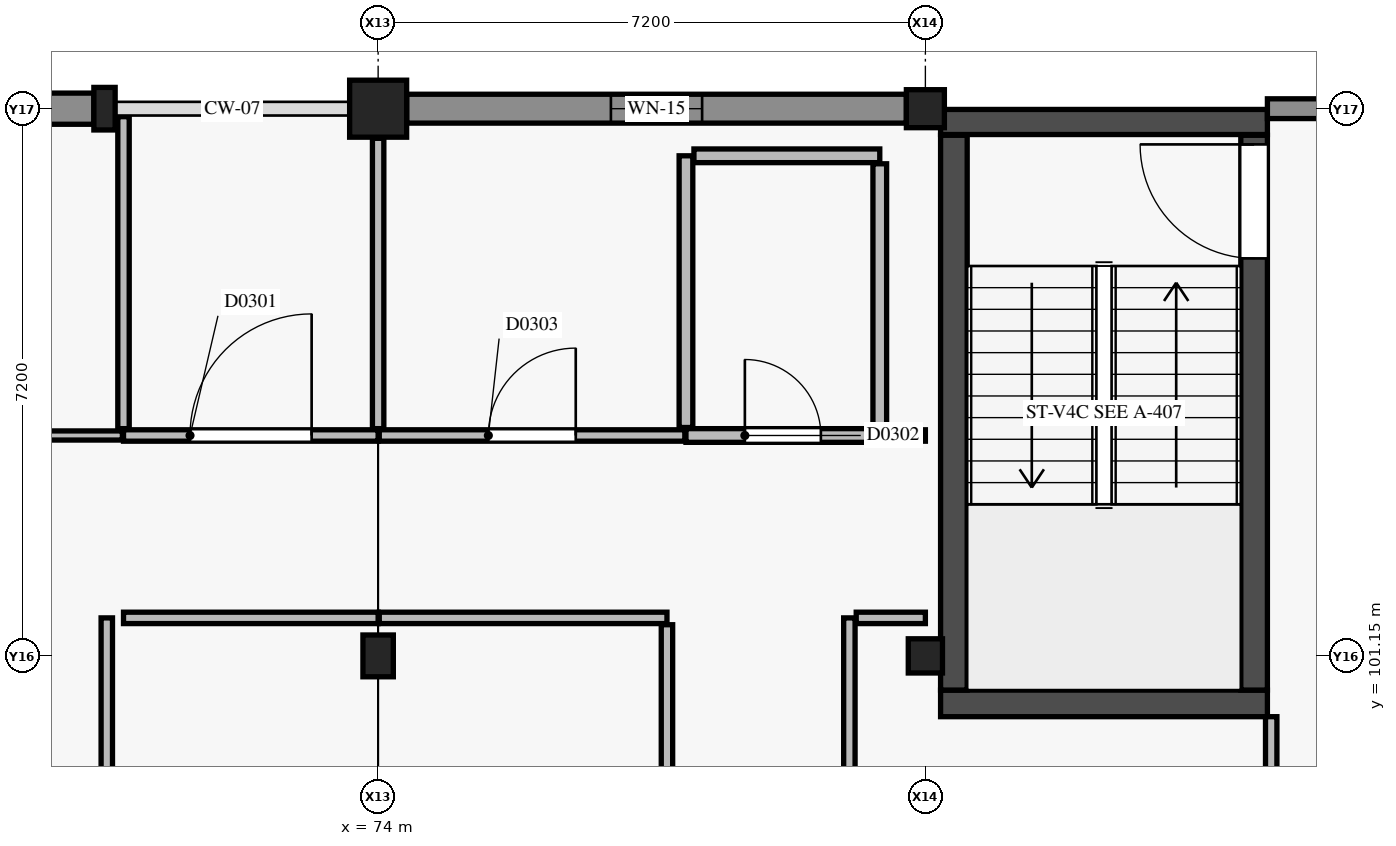
"""IFC4 building model, lengths in metres.
Left out: names, types, materials, properties, quantities, classifications, styles, units other than length and angle.
Written with IfcOpenShell. Run it as: python <this file> out.ifc"""

import sys

from ifc_helpers import new_model, si_unit, direction, frame, frame_2d, origin, origin_2d, place, context, subcontext, project, spatial, rectangle, circle, extrude, element, fill, save


model = new_model("IFC4")
c1 = context("Model", 3, precision=1e-05, world=origin(), true_north=direction((0.0, 1.0)))
c2 = subcontext(c1, "Body", "Model", "MODEL_VIEW")
j1 = project(units=[si_unit("LENGTHUNIT", "METRE"), si_unit("PLANEANGLEUNIT", "RADIAN")], contexts=[c1])
p1 = place(None, origin())
s1 = spatial("IfcSite", under=j1, at=p1, CompositionType="ELEMENT")
p2 = place(p1, origin())
s2 = spatial("IfcBuilding", under=s1, at=p2, CompositionType="ELEMENT")
p3 = place(p2, frame((0.0, 0.0, 17.4)))
s3 = spatial("IfcBuildingStorey", under=s2, at=p3, CompositionType="ELEMENT", Elevation=17.4)
p4 = place(p3, frame((74.0, 101.15, 0.0), z_axis=(0.0, 0.0, 1.0), x_axis=(1.0, 0.0, 0.0)))
e1 = element("IfcColumn", 1, at=p4, inside=s3, PredefinedType="COLUMN", context=c2, shape_type="SweptSolid", body=[
    extrude(rectangle(XDim=0.4, YDim=0.55, at=origin_2d()), origin(), (0.0, 0.0, 1.0), 4.2),
])
p5 = place(p3, frame((74.0, 108.35, 0.0), z_axis=(0.0, 0.0, 1.0), x_axis=(1.0, 0.0, 0.0)))
e2 = element("IfcColumn", 2, at=p5, inside=s3, PredefinedType="COLUMN", context=c2, shape_type="SweptSolid", body=[
    extrude(rectangle(XDim=0.75, YDim=0.75, at=origin_2d()), origin(), (0.0, 0.0, 1.0), 4.2),
])
p6 = place(p3, frame((81.2, 101.15, 0.0), z_axis=(0.0, 0.0, 1.0), x_axis=(1.0, 0.0, 0.0)))
e3 = element("IfcColumn", 3, at=p6, inside=s3, PredefinedType="COLUMN", context=c2, shape_type="SweptSolid", body=[
    extrude(rectangle(XDim=0.45, YDim=0.45, at=origin_2d()), origin(), (0.0, 0.0, 1.0), 4.2),
])
p7 = place(p3, frame((81.2, 108.35, 0.0), z_axis=(0.0, 0.0, 1.0), x_axis=(1.0, 0.0, 0.0)))
e4 = element("IfcColumn", 4, at=p7, inside=s3, PredefinedType="COLUMN", context=c2, shape_type="SweptSolid", body=[
    extrude(circle(Radius=0.25, at=origin_2d()), origin(), (0.0, 0.0, 1.0), 4.2),
])
p8 = place(p3, frame((70.4, 108.35, 0.0), z_axis=(0.0, 0.0, 1.0), x_axis=(1.0, 0.0, 0.0)))
e5 = element("IfcColumn", 5, at=p8, inside=s3, PredefinedType="PILASTER", context=c2, shape_type="SweptSolid", body=[
    extrude(rectangle(XDim=0.28, YDim=0.56, at=origin_2d()), origin(), (0.0, 0.0, 1.0), 4.2),
])
p9 = place(p3, frame((81.4, 100.525, 0.0), z_axis=(0.0, 0.0, 1.0), x_axis=(1.0, 0.0, 0.0)))
e6 = element("IfcWall", 6, at=p9, inside=s3, PredefinedType="SHEAR", context=c2, shape_type="SweptSolid", body=[
    extrude(rectangle(XDim=4.3, YDim=0.35, at=frame_2d((2.15, 0.0))), origin(), (0.0, 0.0, 1.0), 3.92),
])
p10 = place(p3, frame((81.4, 108.175, 0.0), z_axis=(0.0, 0.0, 1.0), x_axis=(1.0, 0.0, 0.0)))
e7 = element("IfcWall", 7, at=p10, inside=s3, PredefinedType="SHEAR", context=c2, shape_type="SweptSolid", body=[
    extrude(rectangle(XDim=4.3, YDim=0.33, at=frame_2d((2.15, 0.0))), origin(), (0.0, 0.0, 1.0), 3.92),
])
p11 = place(p3, frame((81.575, 100.7, 0.0), z_axis=(0.0, 0.0, 1.0), x_axis=(0.0, 1.0, 0.0)))
e8 = element("IfcWall", 8, at=p11, inside=s3, PredefinedType="SHEAR", context=c2, shape_type="SweptSolid", body=[
    extrude(rectangle(XDim=7.3, YDim=0.35, at=frame_2d((3.65, 0.0))), origin(), (0.0, 0.0, 1.0), 3.92),
])
p12 = place(p3, frame((85.525, 100.7, 0.0), z_axis=(0.0, 0.0, 1.0), x_axis=(0.0, 1.0, 0.0)))
e9 = element("IfcWall", 9, at=p12, inside=s3, PredefinedType="SHEAR", context=c2, shape_type="SweptSolid", body=[
    extrude(rectangle(XDim=7.3, YDim=0.35, at=frame_2d((3.65, 0.0))), origin(), (0.0, 0.0, 1.0), 3.92),
])
p13 = place(p12, frame((5.68, 0.0, 0.0)))
e10 = element("IfcOpeningElement", 10, at=p13, cuts=e9, PredefinedType="OPENING", context=c2, shape_type="SweptSolid", body=[
    extrude(rectangle(XDim=1.5, YDim=2.15, at=frame_2d((0.75, 1.075))), frame((0.0, 0.185, 0.0), z_axis=(0.0, -1.0, 0.0), x_axis=(1.0, 0.0, 0.0)), (0.0, 0.0, 1.0), 0.37),
])
p14 = place(p3, frame((67.05, 108.35, 0.0), z_axis=(0.0, 0.0, 1.0), x_axis=(1.0, 0.0, 0.0)))
e11 = element("IfcWall", 11, at=p14, inside=s3, PredefinedType="USERDEFINED", context=c2, shape_type="SweptSolid", body=[
    extrude(rectangle(XDim=3.21, YDim=0.41, at=frame_2d((1.605, 0.0))), origin(), (0.0, 0.0, 1.0), 3.1),
])
p15 = place(p14, frame((0.905, 0.0, 0.9)))
e12 = element("IfcOpeningElement", 12, at=p15, cuts=e11, PredefinedType="OPENING", context=c2, shape_type="SweptSolid", body=[
    extrude(rectangle(XDim=1.4, YDim=1.8, at=frame_2d((0.7, 0.9))), frame((0.0, 0.215, 0.0), z_axis=(0.0, -1.0, 0.0), x_axis=(1.0, 0.0, 0.0)), (0.0, 0.0, 1.0), 0.43),
])
p16 = place(p3, frame((74.375, 108.35, 0.0), z_axis=(0.0, 0.0, 1.0), x_axis=(1.0, 0.0, 0.0)))
e13 = element("IfcWall", 13, at=p16, inside=s3, PredefinedType="USERDEFINED", context=c2, shape_type="SweptSolid", body=[
    extrude(rectangle(XDim=6.575, YDim=0.38, at=frame_2d((3.288, 0.0))), origin(), (0.0, 0.0, 1.0), 3.1),
])
p17 = place(p16, frame((2.688, 0.0, 0.6)))
e14 = element("IfcOpeningElement", 14, at=p17, cuts=e13, PredefinedType="OPENING", context=c2, shape_type="SweptSolid", body=[
    extrude(rectangle(XDim=1.2, YDim=2.2, at=frame_2d((0.6, 1.1))), frame((0.0, 0.2, 0.0), z_axis=(0.0, -1.0, 0.0), x_axis=(1.0, 0.0, 0.0)), (0.0, 0.0, 1.0), 0.4),
])
p18 = place(p3, frame((85.7, 108.35, 0.0), z_axis=(0.0, 0.0, 1.0), x_axis=(1.0, 0.0, 0.0)))
e15 = element("IfcWall", 15, at=p18, inside=s3, PredefinedType="SOLIDWALL", context=c2, shape_type="SweptSolid", body=[
    extrude(rectangle(XDim=2.375, YDim=0.26, at=frame_2d((1.188, 0.0))), origin(), (0.0, 0.0, 1.0), 3.1),
])
p19 = place(p18, frame((0.738, 0.0, 0.95)))
e16 = element("IfcOpeningElement", 16, at=p19, cuts=e15, PredefinedType="OPENING", context=c2, shape_type="SweptSolid", body=[
    extrude(rectangle(XDim=0.9, YDim=1.2, at=frame_2d((0.45, 0.6))), frame((0.0, 0.14, 0.0), z_axis=(0.0, -1.0, 0.0), x_axis=(1.0, 0.0, 0.0)), (0.0, 0.0, 1.0), 0.28),
])
p20 = place(p3, frame((78.05, 104.05, 0.0), z_axis=(0.0, 0.0, 1.0), x_axis=(1.0, 0.0, 0.0)))
e17 = element("IfcWall", 17, at=p20, inside=s3, PredefinedType="PLUMBINGWALL", context=c2, shape_type="SweptSolid", body=[
    extrude(rectangle(XDim=2.55, YDim=0.18, at=frame_2d((1.275, 0.0))), origin(), (0.0, 0.0, 1.0), 3.92),
])
p21 = place(p20, frame((0.775, 0.0, 0.0)))
e18 = element("IfcOpeningElement", 18, at=p21, cuts=e17, PredefinedType="OPENING", context=c2, shape_type="SweptSolid", body=[
    extrude(rectangle(XDim=1.0, YDim=2.15, at=frame_2d((0.5, 1.075))), frame((0.0, 0.1, 0.0), z_axis=(0.0, -1.0, 0.0), x_axis=(1.0, 0.0, 0.0)), (0.0, 0.0, 1.0), 0.2),
])
p22 = place(p3, frame((78.05, 104.155, 0.0), z_axis=(0.0, 0.0, 1.0), x_axis=(0.0, 1.0, 0.0)))
e19 = element("IfcWall", 19, at=p22, inside=s3, PredefinedType="PLUMBINGWALL", context=c2, shape_type="SweptSolid", body=[
    extrude(rectangle(XDim=3.575, YDim=0.18, at=frame_2d((1.788, 0.0))), origin(), (0.0, 0.0, 1.0), 3.485),
])
p23 = place(p3, frame((78.155, 107.73, 0.0), z_axis=(0.0, 0.0, 1.0), x_axis=(1.0, 0.0, 0.0)))
e20 = element("IfcWall", 20, at=p23, inside=s3, PredefinedType="PLUMBINGWALL", context=c2, shape_type="SweptSolid", body=[
    extrude(rectangle(XDim=2.445, YDim=0.18, at=frame_2d((1.223, 0.0))), origin(), (0.0, 0.0, 1.0), 3.92),
])
p24 = place(p3, frame((80.6, 104.155, 0.0), z_axis=(0.0, 0.0, 1.0), x_axis=(0.0, 1.0, 0.0)))
e21 = element("IfcWall", 21, at=p24, inside=s3, PredefinedType="PLUMBINGWALL", context=c2, shape_type="SweptSolid", body=[
    extrude(rectangle(XDim=3.47, YDim=0.18, at=frame_2d((1.735, 0.0))), origin(), (0.0, 0.0, 1.0), 3.485),
])
p25 = place(p3, frame((85.75, 91.55, 0.0), z_axis=(0.0, 0.0, 1.0), x_axis=(0.0, 1.0, 0.0)))
e22 = element("IfcWall", 22, at=p25, inside=s3, PredefinedType="PARTITIONING", context=c2, shape_type="SweptSolid", body=[
    extrude(rectangle(XDim=8.8, YDim=0.15, at=frame_2d((4.4, 0.0))), origin(), (0.0, 0.0, 1.0), 3.385),
])
p26 = place(p3, frame((80.2, 91.64, 0.0), z_axis=(0.0, 0.0, 1.0), x_axis=(0.0, 1.0, 0.0)))
e23 = element("IfcWall", 23, at=p26, inside=s3, PredefinedType="PARTITIONING", context=c2, shape_type="SweptSolid", body=[
    extrude(rectangle(XDim=10.01, YDim=0.15, at=frame_2d((5.005, 0.0))), origin(), (0.0, 0.0, 1.0), 3.185),
])
p27 = place(p26, frame((4.205, 0.0, 0.0)))
e24 = element("IfcOpeningElement", 24, at=p27, cuts=e23, PredefinedType="OPENING", context=c2, shape_type="SweptSolid", body=[
    extrude(rectangle(XDim=1.6, YDim=2.25, at=frame_2d((0.8, 1.125))), frame((0.0, 0.085, 0.0), z_axis=(0.0, -1.0, 0.0), x_axis=(1.0, 0.0, 0.0)), (0.0, 0.0, 1.0), 0.17),
])
p28 = place(p3, frame((80.29, 101.65, 0.0), z_axis=(0.0, 0.0, 1.0), x_axis=(1.0, 0.0, 0.0)))
e25 = element("IfcWall", 25, at=p28, inside=s3, PredefinedType="PARTITIONING", context=c2, shape_type="SweptSolid", body=[
    extrude(rectangle(XDim=0.91, YDim=0.15, at=frame_2d((0.455, 0.0))), origin(), (0.0, 0.0, 1.0), 3.325),
])
p29 = place(p3, frame((70.43, 94.49, 0.0), z_axis=(0.0, 0.0, 1.0), x_axis=(0.0, 1.0, 0.0)))
e26 = element("IfcWall", 26, at=p29, inside=s3, PredefinedType="PARTITIONING", context=c2, shape_type="SweptSolid", body=[
    extrude(rectangle(XDim=7.16, YDim=0.15, at=frame_2d((3.58, 0.0))), origin(), (0.0, 0.0, 1.0), 3.425),
])
p30 = place(p29, frame((2.955, 0.0, 0.0)))
e27 = element("IfcOpeningElement", 27, at=p30, cuts=e26, PredefinedType="OPENING", context=c2, shape_type="SweptSolid", body=[
    extrude(rectangle(XDim=1.25, YDim=2.15, at=frame_2d((0.625, 1.075))), frame((0.0, 0.085, 0.0), z_axis=(0.0, -1.0, 0.0), x_axis=(1.0, 0.0, 0.0)), (0.0, 0.0, 1.0), 0.17),
])
p31 = place(p3, frame((70.65, 101.65, 0.0), z_axis=(0.0, 0.0, 1.0), x_axis=(1.0, 0.0, 0.0)))
e28 = element("IfcWall", 28, at=p31, inside=s3, PredefinedType="PARTITIONING", context=c2, shape_type="SweptSolid", body=[
    extrude(rectangle(XDim=3.35, YDim=0.15, at=frame_2d((1.675, 0.0))), origin(), (0.0, 0.0, 1.0), 3.185),
])
p32 = place(p3, frame((74.015, 101.65, 0.0), z_axis=(0.0, 0.0, 1.0), x_axis=(1.0, 0.0, 0.0)))
e29 = element("IfcWall", 29, at=p32, inside=s3, PredefinedType="PARTITIONING", context=c2, shape_type="SweptSolid", body=[
    extrude(rectangle(XDim=3.785, YDim=0.15, at=frame_2d((1.893, 0.0))), origin(), (0.0, 0.0, 1.0), 3.185),
])
p33 = place(p3, frame((77.8, 99.4, 0.0), z_axis=(0.0, 0.0, 1.0), x_axis=(0.0, 1.0, 0.0)))
e30 = element("IfcWall", 30, at=p33, inside=s3, PredefinedType="PARTITIONING", context=c2, shape_type="SweptSolid", body=[
    extrude(rectangle(XDim=2.16, YDim=0.15, at=frame_2d((1.08, 0.0))), origin(), (0.0, 0.0, 1.0), 3.185),
])
p34 = place(p3, frame((70.65, 104.05, 0.0), z_axis=(0.0, 0.0, 1.0), x_axis=(1.0, 0.0, 0.0)))
e31 = element("IfcWall", 31, at=p34, inside=s3, PredefinedType="PARTITIONING", context=c2, shape_type="SweptSolid", body=[
    extrude(rectangle(XDim=3.35, YDim=0.15, at=frame_2d((1.675, 0.0))), origin(), (0.0, 0.0, 1.0), 3.185),
])
p35 = place(p34, frame((0.875, 0.0, 0.0)))
e32 = element("IfcOpeningElement", 32, at=p35, cuts=e31, PredefinedType="OPENING", context=c2, shape_type="SweptSolid", body=[
    extrude(rectangle(XDim=1.6, YDim=2.25, at=frame_2d((0.8, 1.125))), frame((0.0, 0.085, 0.0), z_axis=(0.0, -1.0, 0.0), x_axis=(1.0, 0.0, 0.0)), (0.0, 0.0, 1.0), 0.17),
])
p36 = place(p3, frame((80.615, 104.05, 0.0), z_axis=(0.0, 0.0, 1.0), x_axis=(1.0, 0.0, 0.0)))
e33 = element("IfcWall", 33, at=p36, inside=s3, PredefinedType="PARTITIONING", context=c2, shape_type="SweptSolid", body=[
    extrude(rectangle(XDim=0.585, YDim=0.15, at=frame_2d((0.292, 0.0))), origin(), (0.0, 0.0, 1.0), 3.325),
])
p37 = place(p3, frame((74.015, 104.05, 0.0), z_axis=(0.0, 0.0, 1.0), x_axis=(1.0, 0.0, 0.0)))
e34 = element("IfcWall", 34, at=p37, inside=s3, PredefinedType="PARTITIONING", context=c2, shape_type="SweptSolid", body=[
    extrude(rectangle(XDim=4.02, YDim=0.15, at=frame_2d((2.01, 0.0))), origin(), (0.0, 0.0, 1.0), 3.185),
])
p38 = place(p37, frame((1.435, 0.0, 0.0)))
e35 = element("IfcOpeningElement", 35, at=p38, cuts=e34, PredefinedType="OPENING", context=c2, shape_type="SweptSolid", body=[
    extrude(rectangle(XDim=1.15, YDim=2.15, at=frame_2d((0.575, 1.075))), frame((0.0, 0.085, 0.0), z_axis=(0.0, -1.0, 0.0), x_axis=(1.0, 0.0, 0.0)), (0.0, 0.0, 1.0), 0.17),
])
p39 = place(p3, frame((66.8, 104.05, 0.0), z_axis=(0.0, 0.0, 1.0), x_axis=(1.0, 0.0, 0.0)))
e36 = element("IfcWall", 36, at=p39, inside=s3, PredefinedType="PARTITIONING", context=c2, shape_type="SweptSolid", body=[
    extrude(rectangle(XDim=3.835, YDim=0.12, at=frame_2d((1.917, 0.0))), origin(), (0.0, 0.0, 1.0), 3.325),
])
p40 = place(p3, frame((70.65, 104.14, 0.0), z_axis=(0.0, 0.0, 1.0), x_axis=(0.0, 1.0, 0.0)))
e37 = element("IfcWall", 37, at=p40, inside=s3, PredefinedType="PARTITIONING", context=c2, shape_type="SweptSolid", body=[
    extrude(rectangle(XDim=4.105, YDim=0.15, at=frame_2d((2.053, 0.0))), origin(), (0.0, 0.0, 1.0), 3.445),
])
p41 = place(p3, frame((74.0, 104.14, 0.0), z_axis=(0.0, 0.0, 1.0), x_axis=(0.0, 1.0, 0.0)))
e38 = element("IfcWall", 38, at=p41, inside=s3, PredefinedType="PARTITIONING", context=c2, shape_type="SweptSolid", body=[
    extrude(rectangle(XDim=3.82, YDim=0.15, at=frame_2d((1.91, 0.0))), origin(), (0.0, 0.0, 1.0), 3.185),
])
p42 = place(p17, origin())
e39 = element("IfcWindow", 39, at=p42, inside=s3, PartitioningType="SINGLE_PANEL", PredefinedType="WINDOW", context=c2, shape_type="SweptSolid", body=[
    extrude(rectangle(XDim=1.2, YDim=2.2, at=frame_2d((0.6, 1.1))), frame((0.0, 0.03, 0.0), z_axis=(0.0, -1.0, 0.0), x_axis=(1.0, 0.0, 0.0)), (0.0, 0.0, 1.0), 0.06),
])
fill(e14, e39)
p43 = place(p13, origin())
e40 = element("IfcDoor", 40, at=p43, inside=s3, OperationType="SINGLE_SWING_RIGHT", PredefinedType="DOOR", context=c2, shape_type="SweptSolid", body=[
    extrude(rectangle(XDim=1.5, YDim=2.15, at=frame_2d((0.75, 1.075))), frame((0.0, 0.025, 0.0), z_axis=(0.0, -1.0, 0.0), x_axis=(1.0, 0.0, 0.0)), (0.0, 0.0, 1.0), 0.05),
])
fill(e10, e40)
p44 = place(p35, origin())
e41 = element("IfcDoor", 41, at=p44, inside=s3, OperationType="SINGLE_SWING_RIGHT", PredefinedType="DOOR", context=c2, shape_type="SweptSolid", body=[
    extrude(rectangle(XDim=1.6, YDim=2.25, at=frame_2d((0.8, 1.125))), frame((0.0, 0.025, 0.0), z_axis=(0.0, -1.0, 0.0), x_axis=(1.0, 0.0, 0.0)), (0.0, 0.0, 1.0), 0.05),
])
fill(e32, e41)
p45 = place(p21, origin())
e42 = element("IfcDoor", 42, at=p45, inside=s3, OperationType="SINGLE_SWING_LEFT", PredefinedType="DOOR", context=c2, shape_type="SweptSolid", body=[
    extrude(rectangle(XDim=1.0, YDim=2.15, at=frame_2d((0.5, 1.075))), frame((0.0, 0.025, 0.0), z_axis=(0.0, -1.0, 0.0), x_axis=(1.0, 0.0, 0.0)), (0.0, 0.0, 1.0), 0.05),
])
fill(e18, e42)
p46 = place(p38, origin())
e43 = element("IfcDoor", 43, at=p46, inside=s3, OperationType="SINGLE_SWING_RIGHT", PredefinedType="DOOR", context=c2, shape_type="SweptSolid", body=[
    extrude(rectangle(XDim=1.15, YDim=2.15, at=frame_2d((0.575, 1.075))), frame((0.0, 0.025, 0.0), z_axis=(0.0, -1.0, 0.0), x_axis=(1.0, 0.0, 0.0)), (0.0, 0.0, 1.0), 0.05),
])
fill(e35, e43)
save(model, sys.argv[1])
